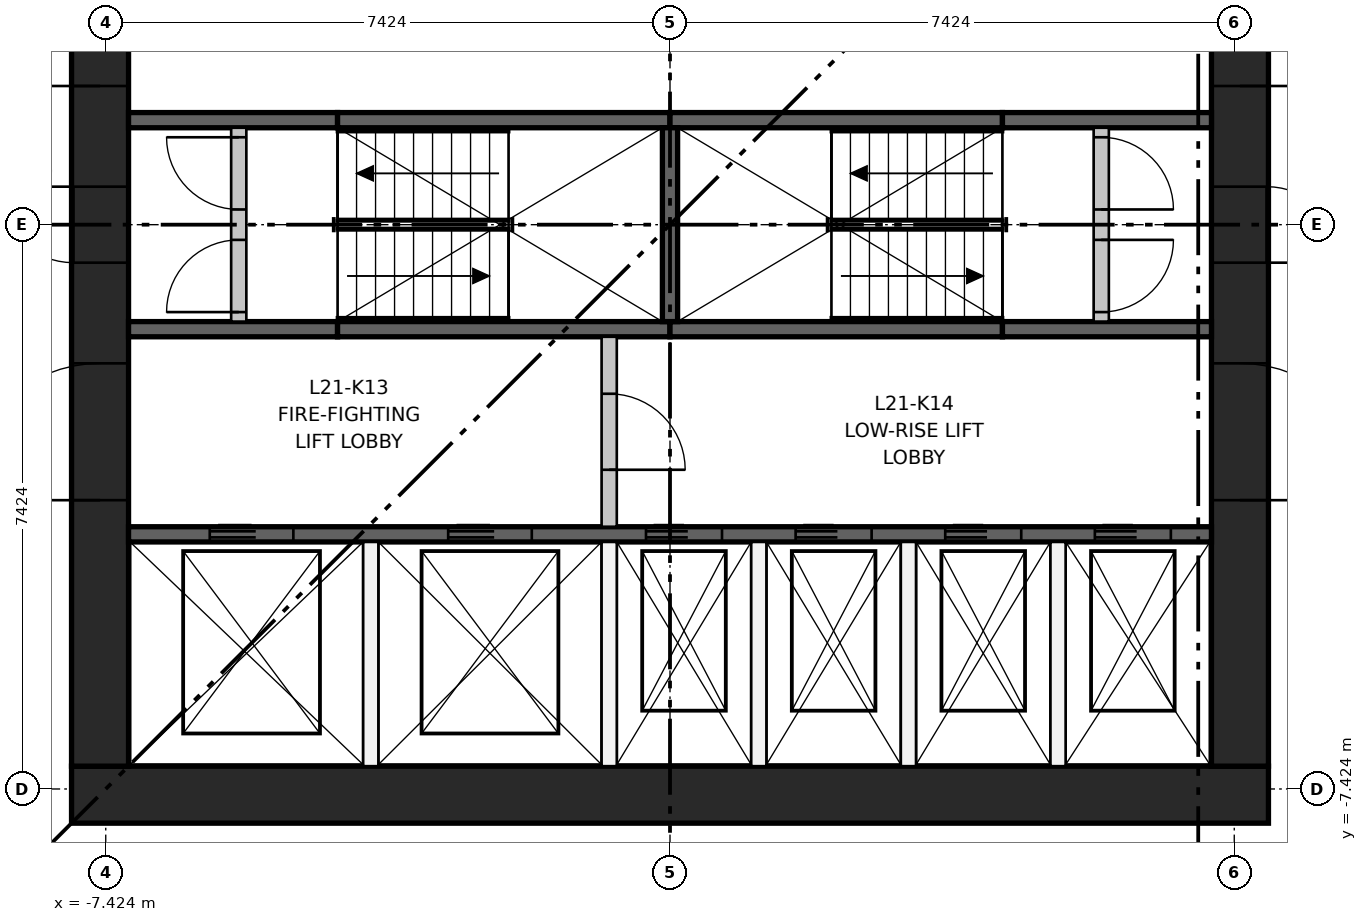
"""IFC4 building model, lengths in metres.
Left out: names, types, materials, properties, quantities, classifications, styles, units other than length and angle.
Written with IfcOpenShell. Run it as: python <this file> out.ifc"""

import sys

from ifc_helpers import new_model, si_unit, direction, frame, frame_2d, origin, place, context, subcontext, project, spatial, rectangle, extrude, element, fill, save


model = new_model("IFC4")
c1 = context("Model", 3, precision=1e-05, world=origin(), true_north=direction((0.0, 1.0)))
c2 = subcontext(c1, "Body", "Model", "MODEL_VIEW")
j1 = project(units=[si_unit("LENGTHUNIT", "METRE"), si_unit("PLANEANGLEUNIT", "RADIAN")], contexts=[c1])
p1 = place(None, origin())
s1 = spatial("IfcSite", under=j1, at=p1, CompositionType="ELEMENT")
p2 = place(p1, origin())
s2 = spatial("IfcBuilding", under=s1, at=p2, CompositionType="ELEMENT")
p3 = place(p2, frame((0.0, 0.0, 83.7)))
s3 = spatial("IfcBuildingStorey", under=s2, at=p3, CompositionType="ELEMENT", Elevation=83.7)
p4 = place(p3, frame((-7.874, -7.499, 0.0), z_axis=(0.0, 0.0, 1.0), x_axis=(1.0, 0.0, 0.0)))
e1 = element("IfcWall", 1, at=p4, inside=s3, PredefinedType="SHEAR", context=c2, shape_type="SweptSolid", body=[
    extrude(rectangle(XDim=15.748, YDim=0.75, at=frame_2d((7.874, 0.0))), origin(), (0.0, 0.0, 1.0), 3.65),
])
p5 = place(p3, frame((-7.499, -7.124, 0.0), z_axis=(0.0, 0.0, 1.0), x_axis=(0.0, 1.0, 0.0)))
e2 = element("IfcWall", 2, at=p5, inside=s3, PredefinedType="SHEAR", context=c2, shape_type="SweptSolid", body=[
    extrude(rectangle(XDim=14.248, YDim=0.75, at=frame_2d((7.124, 0.0))), origin(), (0.0, 0.0, 1.0), 3.65),
])
p6 = place(p5, frame((6.624, 0.0, 0.0)))
e3 = element("IfcOpeningElement", 3, at=p6, cuts=e2, PredefinedType="OPENING", context=c2, shape_type="SweptSolid", body=[
    extrude(rectangle(XDim=1.0, YDim=2.1, at=frame_2d((0.5, 1.05))), frame((0.0, 0.385, 0.0), z_axis=(0.0, -1.0, 0.0), x_axis=(1.0, 0.0, 0.0)), (0.0, 0.0, 1.0), 0.77),
])
p7 = place(p5, frame((3.5, 0.0, 0.0)))
e4 = element("IfcOpeningElement", 4, at=p7, cuts=e2, PredefinedType="OPENING", context=c2, shape_type="SweptSolid", body=[
    extrude(rectangle(XDim=1.8, YDim=2.1, at=frame_2d((0.9, 1.05))), frame((0.0, 0.385, 0.0), z_axis=(0.0, -1.0, 0.0), x_axis=(1.0, 0.0, 0.0)), (0.0, 0.0, 1.0), 0.77),
])
p8 = place(p5, frame((8.948, 0.0, 0.0)))
e5 = element("IfcOpeningElement", 5, at=p8, cuts=e2, PredefinedType="OPENING", context=c2, shape_type="SweptSolid", body=[
    extrude(rectangle(XDim=1.8, YDim=2.1, at=frame_2d((0.9, 1.05))), frame((0.0, 0.385, 0.0), z_axis=(0.0, -1.0, 0.0), x_axis=(1.0, 0.0, 0.0)), (0.0, 0.0, 1.0), 0.77),
])
p9 = place(p5, frame((12.124, 0.0, 0.0)))
e6 = element("IfcOpeningElement", 6, at=p9, cuts=e2, PredefinedType="OPENING", context=c2, shape_type="SweptSolid", body=[
    extrude(rectangle(XDim=1.0, YDim=2.1, at=frame_2d((0.5, 1.05))), frame((0.0, 0.385, 0.0), z_axis=(0.0, -1.0, 0.0), x_axis=(1.0, 0.0, 0.0)), (0.0, 0.0, 1.0), 0.77),
])
p10 = place(p3, frame((7.499, -7.124, 0.0), z_axis=(0.0, 0.0, 1.0), x_axis=(0.0, 1.0, 0.0)))
e7 = element("IfcWall", 7, at=p10, inside=s3, PredefinedType="SHEAR", context=c2, shape_type="SweptSolid", body=[
    extrude(rectangle(XDim=14.248, YDim=0.75, at=frame_2d((7.124, 0.0))), origin(), (0.0, 0.0, 1.0), 3.65),
])
p11 = place(p10, frame((6.624, 0.0, 0.0)))
e8 = element("IfcOpeningElement", 8, at=p11, cuts=e7, PredefinedType="OPENING", context=c2, shape_type="SweptSolid", body=[
    extrude(rectangle(XDim=1.0, YDim=2.1, at=frame_2d((0.5, 1.05))), frame((0.0, 0.385, 0.0), z_axis=(0.0, -1.0, 0.0), x_axis=(1.0, 0.0, 0.0)), (0.0, 0.0, 1.0), 0.77),
])
p12 = place(p10, frame((3.5, 0.0, 0.0)))
e9 = element("IfcOpeningElement", 9, at=p12, cuts=e7, PredefinedType="OPENING", context=c2, shape_type="SweptSolid", body=[
    extrude(rectangle(XDim=1.8, YDim=2.1, at=frame_2d((0.9, 1.05))), frame((0.0, 0.385, 0.0), z_axis=(0.0, -1.0, 0.0), x_axis=(1.0, 0.0, 0.0)), (0.0, 0.0, 1.0), 0.77),
])
p13 = place(p10, frame((8.948, 0.0, 0.0)))
e10 = element("IfcOpeningElement", 10, at=p13, cuts=e7, PredefinedType="OPENING", context=c2, shape_type="SweptSolid", body=[
    extrude(rectangle(XDim=1.8, YDim=2.1, at=frame_2d((0.9, 1.05))), frame((0.0, 0.385, 0.0), z_axis=(0.0, -1.0, 0.0), x_axis=(1.0, 0.0, 0.0)), (0.0, 0.0, 1.0), 0.77),
])
p14 = place(p3, frame((-7.124, -4.074, 0.0), z_axis=(0.0, 0.0, 1.0), x_axis=(1.0, 0.0, 0.0)))
e11 = element("IfcWall", 11, at=p14, inside=s3, PredefinedType="SHEAR", context=c2, shape_type="SweptSolid", body=[
    extrude(rectangle(XDim=14.248, YDim=0.2, at=frame_2d((7.124, 0.0))), origin(), (0.0, 0.0, 1.0), 3.3),
])
p15 = place(p14, frame((1.069, 0.0, 0.0)))
e12 = element("IfcOpeningElement", 12, at=p15, cuts=e11, PredefinedType="OPENING", context=c2, shape_type="SweptSolid", body=[
    extrude(rectangle(XDim=1.1, YDim=2.1, at=frame_2d((0.55, 1.05))), frame((0.0, 0.11, 0.0), z_axis=(0.0, -1.0, 0.0), x_axis=(1.0, 0.0, 0.0)), (0.0, 0.0, 1.0), 0.22),
])
p16 = place(p14, frame((4.206, 0.0, 0.0)))
e13 = element("IfcOpeningElement", 13, at=p16, cuts=e11, PredefinedType="OPENING", context=c2, shape_type="SweptSolid", body=[
    extrude(rectangle(XDim=1.1, YDim=2.1, at=frame_2d((0.55, 1.05))), frame((0.0, 0.11, 0.0), z_axis=(0.0, -1.0, 0.0), x_axis=(1.0, 0.0, 0.0)), (0.0, 0.0, 1.0), 0.22),
])
p17 = place(p14, frame((6.808, 0.0, 0.0)))
e14 = element("IfcOpeningElement", 14, at=p17, cuts=e11, PredefinedType="OPENING", context=c2, shape_type="SweptSolid", body=[
    extrude(rectangle(XDim=1.0, YDim=2.1, at=frame_2d((0.5, 1.05))), frame((0.0, 0.11, 0.0), z_axis=(0.0, -1.0, 0.0), x_axis=(1.0, 0.0, 0.0)), (0.0, 0.0, 1.0), 0.22),
])
p18 = place(p14, frame((8.777, 0.0, 0.0)))
e15 = element("IfcOpeningElement", 15, at=p18, cuts=e11, PredefinedType="OPENING", context=c2, shape_type="SweptSolid", body=[
    extrude(rectangle(XDim=1.0, YDim=2.1, at=frame_2d((0.5, 1.05))), frame((0.0, 0.11, 0.0), z_axis=(0.0, -1.0, 0.0), x_axis=(1.0, 0.0, 0.0)), (0.0, 0.0, 1.0), 0.22),
])
p19 = place(p14, frame((10.745, 0.0, 0.0)))
e16 = element("IfcOpeningElement", 16, at=p19, cuts=e11, PredefinedType="OPENING", context=c2, shape_type="SweptSolid", body=[
    extrude(rectangle(XDim=1.0, YDim=2.1, at=frame_2d((0.5, 1.05))), frame((0.0, 0.11, 0.0), z_axis=(0.0, -1.0, 0.0), x_axis=(1.0, 0.0, 0.0)), (0.0, 0.0, 1.0), 0.22),
])
p20 = place(p14, frame((12.714, 0.0, 0.0)))
e17 = element("IfcOpeningElement", 17, at=p20, cuts=e11, PredefinedType="OPENING", context=c2, shape_type="SweptSolid", body=[
    extrude(rectangle(XDim=1.0, YDim=2.1, at=frame_2d((0.5, 1.05))), frame((0.0, 0.11, 0.0), z_axis=(0.0, -1.0, 0.0), x_axis=(1.0, 0.0, 0.0)), (0.0, 0.0, 1.0), 0.22),
])
p21 = place(p3, frame((-7.124, -1.375, 0.0), z_axis=(0.0, 0.0, 1.0), x_axis=(1.0, 0.0, 0.0)))
e18 = element("IfcWall", 18, at=p21, inside=s3, PredefinedType="SHEAR", context=c2, shape_type="SweptSolid", body=[
    extrude(rectangle(XDim=2.75, YDim=0.2, at=frame_2d((1.375, 0.0))), origin(), (0.0, 0.0, 1.0), 3.3),
])
for number, where, z_axis, x_axis in (
    (19, (-4.374, -1.375, 0.0), (0.0, 0.0, 1.0), (1.0, 0.0, 0.0)),
    (20, (0.0, -1.375, 0.0), (0.0, 0.0, 1.0), (1.0, 0.0, 0.0)),
):
    element("IfcWall", number, at=place(p3, frame(where, z_axis=z_axis, x_axis=x_axis)), inside=s3, PredefinedType="SHEAR", context=c2, shape_type="SweptSolid", body=[
        extrude(rectangle(XDim=4.374, YDim=0.2, at=frame_2d((2.187, 0.0))), origin(), (0.0, 0.0, 1.0), 3.3),
    ])
for number, where, z_axis, x_axis in (
    (21, (4.374, -1.375, 0.0), (0.0, 0.0, 1.0), (1.0, 0.0, 0.0)),
    (22, (-7.124, 1.375, 0.0), (0.0, 0.0, 1.0), (1.0, 0.0, 0.0)),
):
    element("IfcWall", number, at=place(p3, frame(where, z_axis=z_axis, x_axis=x_axis)), inside=s3, PredefinedType="SHEAR", context=c2, shape_type="SweptSolid", body=[
        extrude(rectangle(XDim=2.75, YDim=0.2, at=frame_2d((1.375, 0.0))), origin(), (0.0, 0.0, 1.0), 3.3),
    ])
for number, where, z_axis, x_axis in (
    (23, (-4.374, 1.375, 0.0), (0.0, 0.0, 1.0), (1.0, 0.0, 0.0)),
    (24, (0.0, 1.375, 0.0), (0.0, 0.0, 1.0), (1.0, 0.0, 0.0)),
):
    element("IfcWall", number, at=place(p3, frame(where, z_axis=z_axis, x_axis=x_axis)), inside=s3, PredefinedType="SHEAR", context=c2, shape_type="SweptSolid", body=[
        extrude(rectangle(XDim=4.374, YDim=0.2, at=frame_2d((2.187, 0.0))), origin(), (0.0, 0.0, 1.0), 3.3),
    ])
p22 = place(p3, frame((4.374, 1.375, 0.0), z_axis=(0.0, 0.0, 1.0), x_axis=(1.0, 0.0, 0.0)))
e25 = element("IfcWall", 25, at=p22, inside=s3, PredefinedType="SHEAR", context=c2, shape_type="SweptSolid", body=[
    extrude(rectangle(XDim=2.75, YDim=0.2, at=frame_2d((1.375, 0.0))), origin(), (0.0, 0.0, 1.0), 3.3),
])
p23 = place(p3, frame((0.0, -1.275, 0.0), z_axis=(0.0, 0.0, 1.0), x_axis=(0.0, 1.0, 0.0)))
e26 = element("IfcWall", 26, at=p23, inside=s3, PredefinedType="SHEAR", context=c2, shape_type="SweptSolid", body=[
    extrude(rectangle(XDim=2.55, YDim=0.2, at=frame_2d((1.275, 0.0))), origin(), (0.0, 0.0, 1.0), 3.3),
])
for number, where, z_axis, x_axis in (
    (27, (-3.937, -7.124, 0.0), (0.0, 0.0, 1.0), (0.0, 1.0, 0.0)),
    (28, (-0.8, -7.124, 0.0), (0.0, 0.0, 1.0), (0.0, 1.0, 0.0)),
):
    element("IfcWall", number, at=place(p3, frame(where, z_axis=z_axis, x_axis=x_axis)), inside=s3, PredefinedType="PARTITIONING", context=c2, shape_type="SweptSolid", body=[
        extrude(rectangle(XDim=2.95, YDim=0.2, at=frame_2d((1.475, 0.0))), origin(), (0.0, 0.0, 1.0), 3.3),
    ])
p24 = place(p3, frame((-0.8, -3.974, 0.0), z_axis=(0.0, 0.0, 1.0), x_axis=(0.0, 1.0, 0.0)))
e29 = element("IfcWall", 29, at=p24, inside=s3, PredefinedType="PARTITIONING", context=c2, shape_type="SweptSolid", body=[
    extrude(rectangle(XDim=2.499, YDim=0.2, at=frame_2d((1.25, 0.0))), origin(), (0.0, 0.0, 1.0), 3.3),
])
p25 = place(p24, frame((0.75, 0.0, 0.0)))
e30 = element("IfcOpeningElement", 30, at=p25, cuts=e29, PredefinedType="OPENING", context=c2, shape_type="SweptSolid", body=[
    extrude(rectangle(XDim=1.0, YDim=2.1, at=frame_2d((0.5, 1.05))), frame((0.0, 0.11, 0.0), z_axis=(0.0, -1.0, 0.0), x_axis=(1.0, 0.0, 0.0)), (0.0, 0.0, 1.0), 0.22),
])
for number, where, z_axis, x_axis in (
    (31, (1.168, -7.124, 0.0), (0.0, 0.0, 1.0), (0.0, 1.0, 0.0)),
    (32, (3.137, -7.124, 0.0), (0.0, 0.0, 1.0), (0.0, 1.0, 0.0)),
    (33, (5.105, -7.124, 0.0), (0.0, 0.0, 1.0), (0.0, 1.0, 0.0)),
):
    element("IfcWall", number, at=place(p3, frame(where, z_axis=z_axis, x_axis=x_axis)), inside=s3, PredefinedType="PARTITIONING", context=c2, shape_type="SweptSolid", body=[
        extrude(rectangle(XDim=2.95, YDim=0.2, at=frame_2d((1.475, 0.0))), origin(), (0.0, 0.0, 1.0), 3.3),
    ])
p26 = place(p3, frame((-5.674, -1.275, 0.0), z_axis=(0.0, 0.0, 1.0), x_axis=(0.0, 1.0, 0.0)))
e34 = element("IfcWall", 34, at=p26, inside=s3, PredefinedType="PARTITIONING", context=c2, shape_type="SweptSolid", body=[
    extrude(rectangle(XDim=2.55, YDim=0.2, at=frame_2d((1.275, 0.0))), origin(), (0.0, 0.0, 1.0), 3.3),
])
p27 = place(p26, frame((0.125, 0.0, 0.0)))
e35 = element("IfcOpeningElement", 35, at=p27, cuts=e34, PredefinedType="OPENING", context=c2, shape_type="SweptSolid", body=[
    extrude(rectangle(XDim=0.95, YDim=2.1, at=frame_2d((0.475, 1.05))), frame((0.0, 0.11, 0.0), z_axis=(0.0, -1.0, 0.0), x_axis=(1.0, 0.0, 0.0)), (0.0, 0.0, 1.0), 0.22),
])
p28 = place(p26, frame((1.475, 0.0, 0.0)))
e36 = element("IfcOpeningElement", 36, at=p28, cuts=e34, PredefinedType="OPENING", context=c2, shape_type="SweptSolid", body=[
    extrude(rectangle(XDim=0.95, YDim=2.1, at=frame_2d((0.475, 1.05))), frame((0.0, 0.11, 0.0), z_axis=(0.0, -1.0, 0.0), x_axis=(1.0, 0.0, 0.0)), (0.0, 0.0, 1.0), 0.22),
])
p29 = place(p3, frame((5.674, -1.275, 0.0), z_axis=(0.0, 0.0, 1.0), x_axis=(0.0, 1.0, 0.0)))
e37 = element("IfcWall", 37, at=p29, inside=s3, PredefinedType="PARTITIONING", context=c2, shape_type="SweptSolid", body=[
    extrude(rectangle(XDim=2.55, YDim=0.2, at=frame_2d((1.275, 0.0))), origin(), (0.0, 0.0, 1.0), 3.3),
])
p30 = place(p29, frame((0.125, 0.0, 0.0)))
e38 = element("IfcOpeningElement", 38, at=p30, cuts=e37, PredefinedType="OPENING", context=c2, shape_type="SweptSolid", body=[
    extrude(rectangle(XDim=0.95, YDim=2.1, at=frame_2d((0.475, 1.05))), frame((0.0, 0.11, 0.0), z_axis=(0.0, -1.0, 0.0), x_axis=(1.0, 0.0, 0.0)), (0.0, 0.0, 1.0), 0.22),
])
p31 = place(p29, frame((1.475, 0.0, 0.0)))
e39 = element("IfcOpeningElement", 39, at=p31, cuts=e37, PredefinedType="OPENING", context=c2, shape_type="SweptSolid", body=[
    extrude(rectangle(XDim=0.95, YDim=2.1, at=frame_2d((0.475, 1.05))), frame((0.0, 0.11, 0.0), z_axis=(0.0, -1.0, 0.0), x_axis=(1.0, 0.0, 0.0)), (0.0, 0.0, 1.0), 0.22),
])
p32 = place(p15, origin())
e40 = element("IfcDoor", 40, at=p32, inside=s3, OperationType="DOUBLE_DOOR_SLIDING", PredefinedType="DOOR", context=c2, shape_type="SweptSolid", body=[
    extrude(rectangle(XDim=1.1, YDim=2.1, at=frame_2d((0.55, 1.05))), frame((0.0, 0.025, 0.0), z_axis=(0.0, -1.0, 0.0), x_axis=(1.0, 0.0, 0.0)), (0.0, 0.0, 1.0), 0.05),
])
fill(e12, e40)
p33 = place(p16, origin())
e41 = element("IfcDoor", 41, at=p33, inside=s3, OperationType="DOUBLE_DOOR_SLIDING", PredefinedType="DOOR", context=c2, shape_type="SweptSolid", body=[
    extrude(rectangle(XDim=1.1, YDim=2.1, at=frame_2d((0.55, 1.05))), frame((0.0, 0.025, 0.0), z_axis=(0.0, -1.0, 0.0), x_axis=(1.0, 0.0, 0.0)), (0.0, 0.0, 1.0), 0.05),
])
fill(e13, e41)
p34 = place(p17, origin())
e42 = element("IfcDoor", 42, at=p34, inside=s3, OperationType="DOUBLE_DOOR_SLIDING", PredefinedType="DOOR", context=c2, shape_type="SweptSolid", body=[
    extrude(rectangle(XDim=1.0, YDim=2.1, at=frame_2d((0.5, 1.05))), frame((0.0, 0.025, 0.0), z_axis=(0.0, -1.0, 0.0), x_axis=(1.0, 0.0, 0.0)), (0.0, 0.0, 1.0), 0.05),
])
fill(e14, e42)
p35 = place(p18, origin())
e43 = element("IfcDoor", 43, at=p35, inside=s3, OperationType="DOUBLE_DOOR_SLIDING", PredefinedType="DOOR", context=c2, shape_type="SweptSolid", body=[
    extrude(rectangle(XDim=1.0, YDim=2.1, at=frame_2d((0.5, 1.05))), frame((0.0, 0.025, 0.0), z_axis=(0.0, -1.0, 0.0), x_axis=(1.0, 0.0, 0.0)), (0.0, 0.0, 1.0), 0.05),
])
fill(e15, e43)
p36 = place(p19, origin())
e44 = element("IfcDoor", 44, at=p36, inside=s3, OperationType="DOUBLE_DOOR_SLIDING", PredefinedType="DOOR", context=c2, shape_type="SweptSolid", body=[
    extrude(rectangle(XDim=1.0, YDim=2.1, at=frame_2d((0.5, 1.05))), frame((0.0, 0.025, 0.0), z_axis=(0.0, -1.0, 0.0), x_axis=(1.0, 0.0, 0.0)), (0.0, 0.0, 1.0), 0.05),
])
fill(e16, e44)
p37 = place(p20, origin())
e45 = element("IfcDoor", 45, at=p37, inside=s3, OperationType="DOUBLE_DOOR_SLIDING", PredefinedType="DOOR", context=c2, shape_type="SweptSolid", body=[
    extrude(rectangle(XDim=1.0, YDim=2.1, at=frame_2d((0.5, 1.05))), frame((0.0, 0.025, 0.0), z_axis=(0.0, -1.0, 0.0), x_axis=(1.0, 0.0, 0.0)), (0.0, 0.0, 1.0), 0.05),
])
fill(e17, e45)
p38 = place(p27, origin())
e46 = element("IfcDoor", 46, at=p38, inside=s3, OperationType="SINGLE_SWING_LEFT", PredefinedType="DOOR", context=c2, shape_type="SweptSolid", body=[
    extrude(rectangle(XDim=0.95, YDim=2.1, at=frame_2d((0.475, 1.05))), frame((0.0, 0.025, 0.0), z_axis=(0.0, -1.0, 0.0), x_axis=(1.0, 0.0, 0.0)), (0.0, 0.0, 1.0), 0.05),
])
fill(e35, e46)
p39 = place(p28, origin())
e47 = element("IfcDoor", 47, at=p39, inside=s3, OperationType="SINGLE_SWING_RIGHT", PredefinedType="DOOR", context=c2, shape_type="SweptSolid", body=[
    extrude(rectangle(XDim=0.95, YDim=2.1, at=frame_2d((0.475, 1.05))), frame((0.0, 0.025, 0.0), z_axis=(0.0, -1.0, 0.0), x_axis=(1.0, 0.0, 0.0)), (0.0, 0.0, 1.0), 0.05),
])
fill(e36, e47)
p40 = place(p30, frame((0.95, 0.0, 0.0), z_axis=(0.0, 0.0, 1.0), x_axis=(-1.0, 0.0, 0.0)))
e48 = element("IfcDoor", 48, at=p40, inside=s3, OperationType="SINGLE_SWING_RIGHT", PredefinedType="DOOR", context=c2, shape_type="SweptSolid", body=[
    extrude(rectangle(XDim=0.95, YDim=2.1, at=frame_2d((0.475, 1.05))), frame((0.0, 0.025, 0.0), z_axis=(0.0, -1.0, 0.0), x_axis=(1.0, 0.0, 0.0)), (0.0, 0.0, 1.0), 0.05),
])
fill(e38, e48)
p41 = place(p31, frame((0.95, 0.0, 0.0), z_axis=(0.0, 0.0, 1.0), x_axis=(-1.0, 0.0, 0.0)))
e49 = element("IfcDoor", 49, at=p41, inside=s3, OperationType="SINGLE_SWING_LEFT", PredefinedType="DOOR", context=c2, shape_type="SweptSolid", body=[
    extrude(rectangle(XDim=0.95, YDim=2.1, at=frame_2d((0.475, 1.05))), frame((0.0, 0.025, 0.0), z_axis=(0.0, -1.0, 0.0), x_axis=(1.0, 0.0, 0.0)), (0.0, 0.0, 1.0), 0.05),
])
fill(e39, e49)
p42 = place(p25, frame((1.0, 0.0, 0.0), z_axis=(0.0, 0.0, 1.0), x_axis=(-1.0, 0.0, 0.0)))
e50 = element("IfcDoor", 50, at=p42, inside=s3, OperationType="SINGLE_SWING_LEFT", PredefinedType="DOOR", context=c2, shape_type="SweptSolid", body=[
    extrude(rectangle(XDim=1.0, YDim=2.1, at=frame_2d((0.5, 1.05))), frame((0.0, 0.025, 0.0), z_axis=(0.0, -1.0, 0.0), x_axis=(1.0, 0.0, 0.0)), (0.0, 0.0, 1.0), 0.05),
])
fill(e30, e50)
p43 = place(p6, origin())
e51 = element("IfcDoor", 51, at=p43, inside=s3, OperationType="SINGLE_SWING_RIGHT", PredefinedType="DOOR", context=c2, shape_type="SweptSolid", body=[
    extrude(rectangle(XDim=1.0, YDim=2.1, at=frame_2d((0.5, 1.05))), frame((0.0, 0.375, 0.0), z_axis=(0.0, -1.0, 0.0), x_axis=(1.0, 0.0, 0.0)), (0.0, 0.0, 1.0), 0.05),
])
fill(e3, e51)
p44 = place(p7, origin())
e52 = element("IfcDoor", 52, at=p44, inside=s3, OperationType="DOUBLE_DOOR_SINGLE_SWING", PredefinedType="DOOR", context=c2, shape_type="SweptSolid", body=[
    extrude(rectangle(XDim=1.8, YDim=2.1, at=frame_2d((0.9, 1.05))), frame((0.0, 0.025, 0.0), z_axis=(0.0, -1.0, 0.0), x_axis=(1.0, 0.0, 0.0)), (0.0, 0.0, 1.0), 0.05),
])
fill(e4, e52)
p45 = place(p8, origin())
e53 = element("IfcDoor", 53, at=p45, inside=s3, OperationType="DOUBLE_DOOR_SINGLE_SWING", PredefinedType="DOOR", context=c2, shape_type="SweptSolid", body=[
    extrude(rectangle(XDim=1.8, YDim=2.1, at=frame_2d((0.9, 1.05))), frame((0.0, 0.025, 0.0), z_axis=(0.0, -1.0, 0.0), x_axis=(1.0, 0.0, 0.0)), (0.0, 0.0, 1.0), 0.05),
])
fill(e5, e53)
p46 = place(p11, frame((1.0, 0.0, 0.0), z_axis=(0.0, 0.0, 1.0), x_axis=(-1.0, 0.0, 0.0)))
e54 = element("IfcDoor", 54, at=p46, inside=s3, OperationType="SINGLE_SWING_LEFT", PredefinedType="DOOR", context=c2, shape_type="SweptSolid", body=[
    extrude(rectangle(XDim=1.0, YDim=2.1, at=frame_2d((0.5, 1.05))), frame((0.0, 0.375, 0.0), z_axis=(0.0, -1.0, 0.0), x_axis=(1.0, 0.0, 0.0)), (0.0, 0.0, 1.0), 0.05),
])
fill(e8, e54)
p47 = place(p12, frame((1.8, 0.0, 0.0), z_axis=(0.0, 0.0, 1.0), x_axis=(-1.0, 0.0, 0.0)))
e55 = element("IfcDoor", 55, at=p47, inside=s3, OperationType="DOUBLE_DOOR_SINGLE_SWING", PredefinedType="DOOR", context=c2, shape_type="SweptSolid", body=[
    extrude(rectangle(XDim=1.8, YDim=2.1, at=frame_2d((0.9, 1.05))), frame((0.0, 0.025, 0.0), z_axis=(0.0, -1.0, 0.0), x_axis=(1.0, 0.0, 0.0)), (0.0, 0.0, 1.0), 0.05),
])
fill(e9, e55)
p48 = place(p13, frame((1.8, 0.0, 0.0), z_axis=(0.0, 0.0, 1.0), x_axis=(-1.0, 0.0, 0.0)))
e56 = element("IfcDoor", 56, at=p48, inside=s3, OperationType="DOUBLE_DOOR_SINGLE_SWING", PredefinedType="DOOR", context=c2, shape_type="SweptSolid", body=[
    extrude(rectangle(XDim=1.8, YDim=2.1, at=frame_2d((0.9, 1.05))), frame((0.0, 0.025, 0.0), z_axis=(0.0, -1.0, 0.0), x_axis=(1.0, 0.0, 0.0)), (0.0, 0.0, 1.0), 0.05),
])
fill(e10, e56)
save(model, sys.argv[1])
